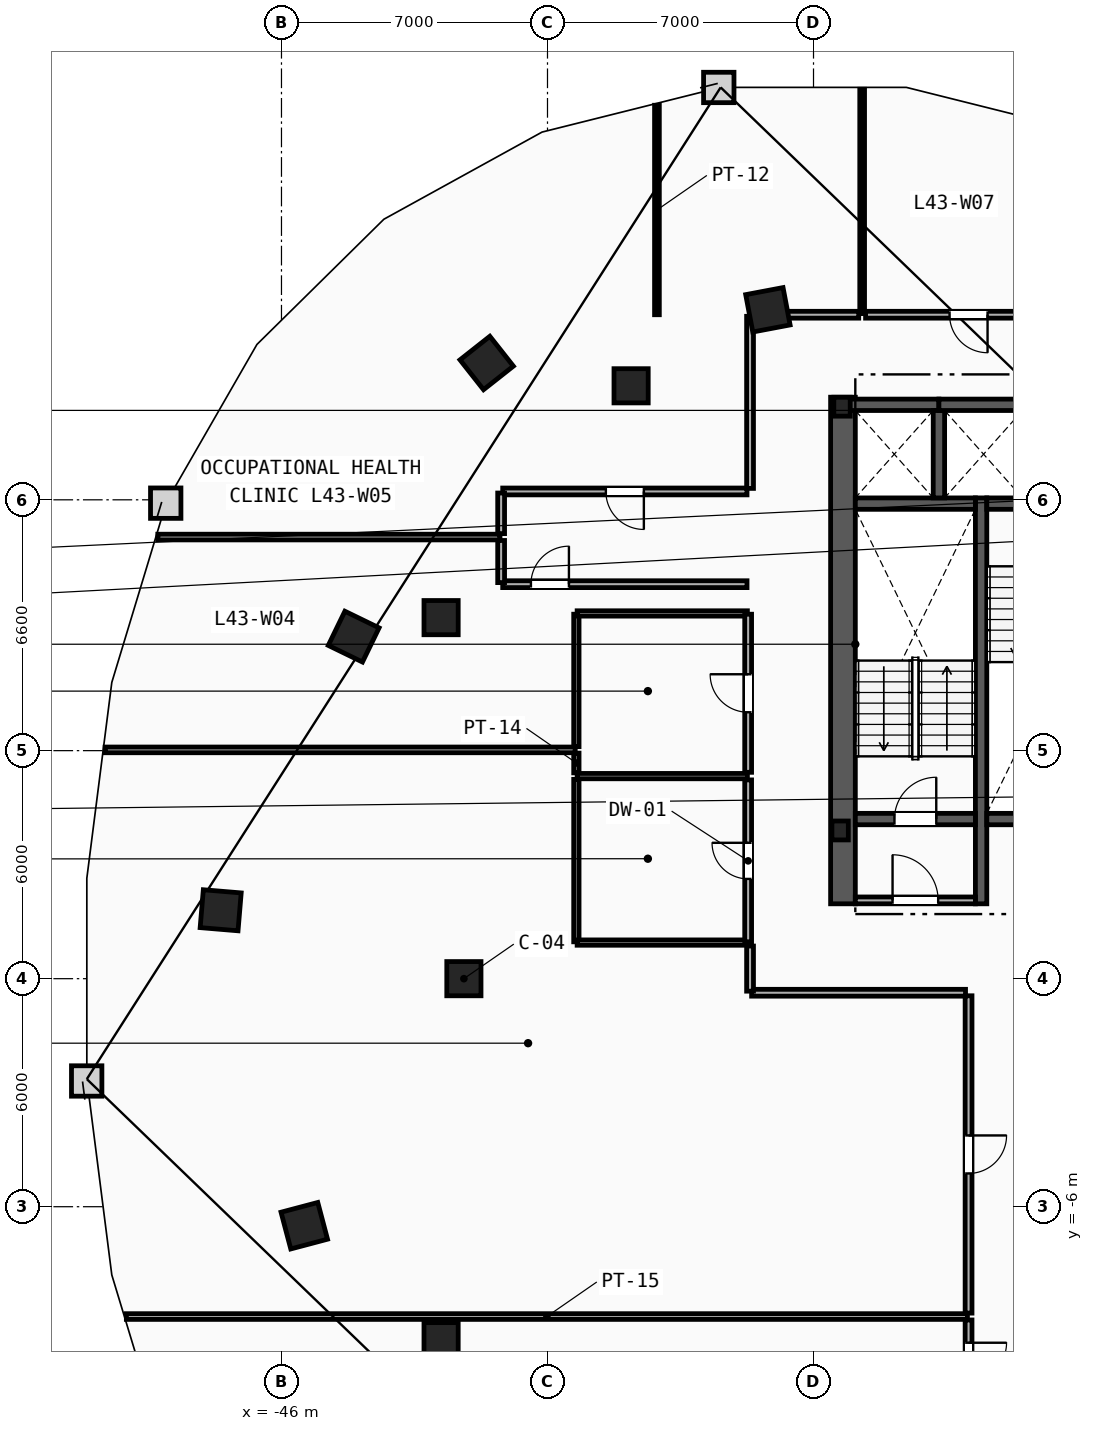
"""IFC4 building model, lengths in metres.
Left out: names, types, materials, properties, quantities, classifications, styles, units other than length and angle.
Written with IfcOpenShell. Run it as: python <this file> out.ifc"""

import sys

from ifc_helpers import new_model, si_unit, direction, frame, frame_2d, origin, origin_2d, place, context, subcontext, project, spatial, rectangle, i_section, extrude, element, fill, save


model = new_model("IFC4")
c1 = context("Model", 3, precision=1e-05, world=origin(), true_north=direction((0.0, 1.0)))
c2 = subcontext(c1, "Body", "Model", "MODEL_VIEW")
j1 = project(units=[si_unit("LENGTHUNIT", "METRE"), si_unit("PLANEANGLEUNIT", "RADIAN")], contexts=[c1])
p1 = place(None, origin())
s1 = spatial("IfcSite", under=j1, at=p1, CompositionType="ELEMENT")
p2 = place(p1, origin())
s2 = spatial("IfcBuilding", under=s1, at=p2, CompositionType="ELEMENT")
p3 = place(p2, frame((0.0, 0.0, 165.6)))
s3 = spatial("IfcBuildingStorey", under=s2, at=p3, CompositionType="ELEMENT", Elevation=165.6)
for number, where, z_axis, x_axis in (
    (1, (-31.3, 3.9, 0.0), (0.0, 0.0, 1.0), (1.0, 0.0, 0.0)),
    (2, (-31.25, 15.05, 0.0), (0.0, 0.0, 1.0), (1.0, 0.0, 0.0)),
):
    element("IfcColumn", number, at=place(p3, frame(where, z_axis=z_axis, x_axis=x_axis)), inside=s3, PredefinedType="COLUMN", context=c2, shape_type="SweptSolid", body=[
        extrude(i_section(OverallWidth=0.432, OverallDepth=0.498, WebThickness=0.056, FlangeThickness=0.089, FilletRadius=0.018, at=origin_2d()), origin(), (0.0, 0.0, 1.0), 3.6),
    ])
for number, where, z_axis, x_axis in (
    (3, (-41.2, 0.0, 0.0), (0.0, 0.0, 1.0), (1.0, 0.0, 0.0)),
    (4, (-41.8, 9.5, 0.0), (0.0, 0.0, 1.0), (1.0, 0.0, 0.0)),
    (5, (-36.8, 15.6, 0.0), (0.0, 0.0, 1.0), (1.0, 0.0, 0.0)),
    (6, (-41.8, -9.5, 0.0), (0.0, 0.0, 1.0), (1.0, 0.0, 0.0)),
):
    element("IfcColumn", number, at=place(p3, frame(where, z_axis=z_axis, x_axis=x_axis)), inside=s3, PredefinedType="COLUMN", context=c2, shape_type="SweptSolid", body=[
        extrude(rectangle(XDim=0.9, YDim=0.9, at=origin_2d()), origin(), (0.0, 0.0, 1.0), 3.6),
    ])
for number, where, z_axis, x_axis in (
    (7, (-33.2, 17.6, 0.0), (0.0, 0.0, 1.0), (-0.983, -0.186, 0.0)),
    (8, (-40.6, 16.2, 0.0), (0.0, 0.0, 1.0), (-0.785, -0.619, 0.0)),
    (9, (-44.1, 9.0, 0.0), (0.0, 0.0, 1.0), (-0.437, -0.899, 0.0)),
    (10, (-47.6, 1.8, 0.0), (0.0, 0.0, 1.0), (-0.084, -0.997, 0.0)),
    (11, (-45.4, -6.5, 0.0), (0.0, 0.0, 1.0), (0.256, -0.967, 0.0)),
):
    element("IfcColumn", number, at=place(p3, frame(where, z_axis=z_axis, x_axis=x_axis)), inside=s3, PredefinedType="COLUMN", context=c2, shape_type="SweptSolid", body=[
        extrude(rectangle(XDim=1.0, YDim=1.0, at=origin_2d()), origin(), (0.0, 0.0, 1.0), 3.6),
    ])
p4 = place(p3, frame((-31.225, 1.97, 0.0), z_axis=(0.0, 0.0, 1.0), x_axis=(0.0, 1.0, 0.0)))
e12 = element("IfcWall", 12, at=p4, inside=s3, PredefinedType="SHEAR", context=c2, shape_type="SweptSolid", body=[
    extrude(rectangle(XDim=13.33, YDim=0.65, at=frame_2d((6.665, 0.0))), origin(), (0.0, 0.0, 1.0), 3.36),
])
p5 = place(p3, frame((-27.59, 1.97, 0.0), z_axis=(0.0, 0.0, 1.0), x_axis=(0.0, 1.0, 0.0)))
e13 = element("IfcWall", 13, at=p5, inside=s3, PredefinedType="SHEAR", context=c2, shape_type="SweptSolid", body=[
    extrude(rectangle(XDim=10.68, YDim=0.3, at=frame_2d((5.34, 0.0))), origin(), (0.0, 0.0, 1.0), 3.36),
])
p6 = place(p3, frame((-30.9, 4.2, 0.0), z_axis=(0.0, 0.0, 1.0), x_axis=(1.0, 0.0, 0.0)))
e14 = element("IfcWall", 14, at=p6, inside=s3, PredefinedType="SHEAR", context=c2, shape_type="SweptSolid", body=[
    extrude(rectangle(XDim=3.16, YDim=0.3, at=frame_2d((1.58, 0.0))), origin(), (0.0, 0.0, 1.0), 3.36),
])
p7 = place(p6, frame((1.03, 0.0, 0.0)))
e15 = element("IfcOpeningElement", 15, at=p7, cuts=e14, PredefinedType="OPENING", context=c2, shape_type="SweptSolid", body=[
    extrude(rectangle(XDim=1.1, YDim=2.15, at=frame_2d((0.55, 1.075))), frame((0.0, 0.16, 0.0), z_axis=(0.0, -1.0, 0.0), x_axis=(1.0, 0.0, 0.0)), (0.0, 0.0, 1.0), 0.32),
])
p8 = place(p3, frame((-30.9, 12.5, 0.0), z_axis=(0.0, 0.0, 1.0), x_axis=(1.0, 0.0, 0.0)))
e16 = element("IfcWall", 16, at=p8, inside=s3, PredefinedType="SHEAR", context=c2, shape_type="SweptSolid", body=[
    extrude(rectangle(XDim=3.16, YDim=0.3, at=frame_2d((1.58, 0.0))), origin(), (0.0, 0.0, 1.0), 3.36),
])
p9 = place(p3, frame((-27.44, 12.5, 0.0), z_axis=(0.0, 0.0, 1.0), x_axis=(1.0, 0.0, 0.0)))
e17 = element("IfcWall", 17, at=p9, inside=s3, PredefinedType="SHEAR", context=c2, shape_type="SweptSolid", body=[
    extrude(rectangle(XDim=3.16, YDim=0.3, at=frame_2d((1.58, 0.0))), origin(), (0.0, 0.0, 1.0), 3.36),
])
p10 = place(p9, frame((1.03, 0.0, 0.0)))
e18 = element("IfcOpeningElement", 18, at=p10, cuts=e17, PredefinedType="OPENING", context=c2, shape_type="SweptSolid", body=[
    extrude(rectangle(XDim=1.1, YDim=2.15, at=frame_2d((0.55, 1.075))), frame((0.0, 0.16, 0.0), z_axis=(0.0, -1.0, 0.0), x_axis=(1.0, 0.0, 0.0)), (0.0, 0.0, 1.0), 0.32),
])
p11 = place(p3, frame((-27.44, 4.2, 0.0), z_axis=(0.0, 0.0, 1.0), x_axis=(1.0, 0.0, 0.0)))
e19 = element("IfcWall", 19, at=p11, inside=s3, PredefinedType="SHEAR", context=c2, shape_type="SweptSolid", body=[
    extrude(rectangle(XDim=3.16, YDim=0.3, at=frame_2d((1.58, 0.0))), origin(), (0.0, 0.0, 1.0), 3.36),
])
p12 = place(p3, frame((-30.9, 2.06, 0.0), z_axis=(0.0, 0.0, 1.0), x_axis=(1.0, 0.0, 0.0)))
e20 = element("IfcWall", 20, at=p12, inside=s3, PredefinedType="PARTITIONING", context=c2, shape_type="SweptSolid", body=[
    extrude(rectangle(XDim=3.16, YDim=0.18, at=frame_2d((1.58, 0.0))), origin(), (0.0, 0.0, 1.0), 3.36),
])
p13 = place(p12, frame((0.98, 0.0, 0.0)))
e21 = element("IfcOpeningElement", 21, at=p13, cuts=e20, PredefinedType="OPENING", context=c2, shape_type="SweptSolid", body=[
    extrude(rectangle(XDim=1.2, YDim=2.15, at=frame_2d((0.6, 1.075))), frame((0.0, 0.1, 0.0), z_axis=(0.0, -1.0, 0.0), x_axis=(1.0, 0.0, 0.0)), (0.0, 0.0, 1.0), 0.2),
])
p14 = place(p3, frame((-31.2, 15.1, 0.0), z_axis=(0.0, 0.0, 1.0), x_axis=(1.0, 0.0, 0.0)))
e22 = element("IfcWall", 22, at=p14, inside=s3, PredefinedType="SHEAR", context=c2, shape_type="SweptSolid", body=[
    extrude(rectangle(XDim=2.5, YDim=0.3, at=frame_2d((1.25, 0.0))), origin(), (0.0, 0.0, 1.0), 3.36),
])
p15 = place(p3, frame((-28.7, 12.65, 0.0), z_axis=(0.0, 0.0, 1.0), x_axis=(0.0, 1.0, 0.0)))
e23 = element("IfcWall", 23, at=p15, inside=s3, PredefinedType="SHEAR", context=c2, shape_type="SweptSolid", body=[
    extrude(rectangle(XDim=2.3, YDim=0.3, at=frame_2d((1.15, 0.0))), origin(), (0.0, 0.0, 1.0), 3.36),
])
p16 = place(p3, frame((-28.7, 15.1, 0.0), z_axis=(0.0, 0.0, 1.0), x_axis=(1.0, 0.0, 0.0)))
e24 = element("IfcWall", 24, at=p16, inside=s3, PredefinedType="SHEAR", context=c2, shape_type="SweptSolid", body=[
    extrude(rectangle(XDim=2.5, YDim=0.3, at=frame_2d((1.25, 0.0))), origin(), (0.0, 0.0, 1.0), 3.36),
])
p17 = place(p3, frame((-38.24, 0.97, 0.0), z_axis=(0.0, 0.0, 1.0), x_axis=(0.0, 1.0, 0.0)))
e25 = element("IfcWall", 25, at=p17, inside=s3, PredefinedType="PARTITIONING", context=c2, shape_type="SweptSolid", body=[
    extrude(rectangle(XDim=4.275, YDim=0.14, at=frame_2d((2.138, 0.0))), origin(), (0.0, 0.0, 1.0), 3.36),
])
p18 = place(p3, frame((-38.24, 5.415, 0.0), z_axis=(0.0, 0.0, 1.0), x_axis=(0.0, 1.0, 0.0)))
e26 = element("IfcWall", 26, at=p18, inside=s3, PredefinedType="PARTITIONING", context=c2, shape_type="SweptSolid", body=[
    extrude(rectangle(XDim=0.52, YDim=0.14, at=frame_2d((0.26, 0.0))), origin(), (0.0, 0.0, 1.0), 3.36),
])
p19 = place(p3, frame((-38.24, 6.105, 0.0), z_axis=(0.0, 0.0, 1.0), x_axis=(0.0, 1.0, 0.0)))
e27 = element("IfcWall", 27, at=p19, inside=s3, PredefinedType="PARTITIONING", context=c2, shape_type="SweptSolid", body=[
    extrude(rectangle(XDim=3.485, YDim=0.14, at=frame_2d((1.743, 0.0))), origin(), (0.0, 0.0, 1.0), 3.36),
])
for number, where, z_axis, x_axis in (
    (28, (-38.22, 0.95, 0.0), (0.0, 0.0, 1.0), (1.0, 0.0, 0.0)),
    (29, (-38.22, 5.33, 0.0), (0.0, 0.0, 1.0), (1.0, 0.0, 0.0)),
    (30, (-38.22, 9.61, 0.0), (0.0, 0.0, 1.0), (1.0, 0.0, 0.0)),
):
    element("IfcWall", number, at=place(p3, frame(where, z_axis=z_axis, x_axis=x_axis)), inside=s3, PredefinedType="PARTITIONING", context=c2, shape_type="SweptSolid", body=[
        extrude(rectangle(XDim=4.48, YDim=0.14, at=frame_2d((2.24, 0.0))), origin(), (0.0, 0.0, 1.0), 3.36),
    ])
p20 = place(p3, frame((-33.72, 0.97, 0.0), z_axis=(0.0, 0.0, 1.0), x_axis=(0.0, 1.0, 0.0)))
e31 = element("IfcWall", 31, at=p20, inside=s3, PredefinedType="PARTITIONING", context=c2, shape_type="SweptSolid", body=[
    extrude(rectangle(XDim=4.26, YDim=0.18, at=frame_2d((2.13, 0.0))), origin(), (0.0, 0.0, 1.0), 3.36),
])
p21 = place(p20, frame((1.655, 0.0, 0.0)))
e32 = element("IfcOpeningElement", 32, at=p21, cuts=e31, PredefinedType="OPENING", context=c2, shape_type="SweptSolid", body=[
    extrude(rectangle(XDim=0.95, YDim=2.1, at=frame_2d((0.475, 1.05))), frame((0.0, 0.1, 0.0), z_axis=(0.0, -1.0, 0.0), x_axis=(1.0, 0.0, 0.0)), (0.0, 0.0, 1.0), 0.2),
])
p22 = place(p3, frame((-33.72, 5.43, 0.0), z_axis=(0.0, 0.0, 1.0), x_axis=(0.0, 1.0, 0.0)))
e33 = element("IfcWall", 33, at=p22, inside=s3, PredefinedType="PARTITIONING", context=c2, shape_type="SweptSolid", body=[
    extrude(rectangle(XDim=4.16, YDim=0.18, at=frame_2d((2.08, 0.0))), origin(), (0.0, 0.0, 1.0), 3.36),
])
p23 = place(p22, frame((1.58, 0.0, 0.0)))
e34 = element("IfcOpeningElement", 34, at=p23, cuts=e33, PredefinedType="OPENING", context=c2, shape_type="SweptSolid", body=[
    extrude(rectangle(XDim=1.0, YDim=2.15, at=frame_2d((0.5, 1.075))), frame((0.0, 0.1, 0.0), z_axis=(0.0, -1.0, 0.0), x_axis=(1.0, 0.0, 0.0)), (0.0, 0.0, 1.0), 0.2),
])
p24 = place(p3, frame((-50.082, -8.89, 0.0), z_axis=(0.0, 0.0, 1.0), x_axis=(1.0, 0.0, 0.0)))
e35 = element("IfcWall", 35, at=p24, inside=s3, PredefinedType="PARTITIONING", context=c2, shape_type="SweptSolid", body=[
    extrude(rectangle(XDim=22.132, YDim=0.15, at=frame_2d((11.066, 0.0))), origin(), (0.0, 0.0, 1.0), 3.36),
])
p25 = place(p3, frame((-50.641, 6.02, 0.0), z_axis=(0.0, 0.0, 1.0), x_axis=(1.0, 0.0, 0.0)))
e36 = element("IfcWall", 36, at=p25, inside=s3, PredefinedType="PARTITIONING", context=c2, shape_type="SweptSolid", body=[
    extrude(rectangle(XDim=12.371, YDim=0.15, at=frame_2d((6.186, 0.0))), origin(), (0.0, 0.0, 1.0), 3.36),
])
p26 = place(p3, frame((-49.254, 11.62, 0.0), z_axis=(0.0, 0.0, 1.0), x_axis=(1.0, 0.0, 0.0)))
e37 = element("IfcWall", 37, at=p26, inside=s3, PredefinedType="PARTITIONING", context=c2, shape_type="SweptSolid", body=[
    extrude(rectangle(XDim=9.004, YDim=0.15, at=frame_2d((4.502, 0.0))), origin(), (0.0, 0.0, 1.0), 3.36),
])
p27 = place(p3, frame((-36.12, 17.47, 0.0), z_axis=(0.0, 0.0, 1.0), x_axis=(0.0, 1.0, 0.0)))
e38 = element("IfcWall", 38, at=p27, inside=s3, PredefinedType="PARTITIONING", context=c2, shape_type="SweptSolid", body=[
    extrude(rectangle(XDim=5.511, YDim=0.125, at=frame_2d((2.756, 0.0))), origin(), (0.0, 0.0, 1.0), 3.36),
])
p28 = place(p3, frame((-30.72, 17.5, 0.0), z_axis=(0.0, 0.0, 1.0), x_axis=(0.0, 1.0, 0.0)))
e39 = element("IfcWall", 39, at=p28, inside=s3, PredefinedType="PARTITIONING", context=c2, shape_type="SweptSolid", body=[
    extrude(rectangle(XDim=5.902, YDim=0.125, at=frame_2d((2.951, 0.0))), origin(), (0.0, 0.0, 1.0), 3.36),
])
p29 = place(p3, frame((-27.92, -8.98, 0.0), z_axis=(0.0, 0.0, 1.0), x_axis=(0.0, -1.0, 0.0)))
e40 = element("IfcWall", 40, at=p29, inside=s3, PredefinedType="PARTITIONING", context=c2, shape_type="SweptSolid", body=[
    extrude(rectangle(XDim=2.198, YDim=0.18, at=frame_2d((1.099, 0.0))), origin(), (0.0, 0.0, 1.0), 3.36),
])
p30 = place(p29, frame((0.599, 0.0, 0.0)))
e41 = element("IfcOpeningElement", 41, at=p30, cuts=e40, PredefinedType="OPENING", context=c2, shape_type="SweptSolid", body=[
    extrude(rectangle(XDim=1.0, YDim=2.15, at=frame_2d((0.5, 1.075))), frame((0.0, 0.1, 0.0), z_axis=(0.0, -1.0, 0.0), x_axis=(1.0, 0.0, 0.0)), (0.0, 0.0, 1.0), 0.2),
])
p31 = place(p3, frame((-27.92, -0.45, 0.0), z_axis=(0.0, 0.0, 1.0), x_axis=(0.0, -1.0, 0.0)))
e42 = element("IfcWall", 42, at=p31, inside=s3, PredefinedType="PARTITIONING", context=c2, shape_type="SweptSolid", body=[
    extrude(rectangle(XDim=8.35, YDim=0.18, at=frame_2d((4.175, 0.0))), origin(), (0.0, 0.0, 1.0), 3.36),
])
p32 = place(p31, frame((3.675, 0.0, 0.0)))
e43 = element("IfcOpeningElement", 43, at=p32, cuts=e42, PredefinedType="OPENING", context=c2, shape_type="SweptSolid", body=[
    extrude(rectangle(XDim=1.0, YDim=2.15, at=frame_2d((0.5, 1.075))), frame((0.0, 0.1, 0.0), z_axis=(0.0, -1.0, 0.0), x_axis=(1.0, 0.0, 0.0)), (0.0, 0.0, 1.0), 0.2),
])
p33 = place(p3, frame((-33.628, -0.37, 0.0), z_axis=(0.0, 0.0, 1.0), x_axis=(1.0, 0.0, 0.0)))
e44 = element("IfcWall", 44, at=p33, inside=s3, PredefinedType="PARTITIONING", context=c2, shape_type="SweptSolid", body=[
    extrude(rectangle(XDim=5.628, YDim=0.18, at=frame_2d((2.814, 0.0))), origin(), (0.0, 0.0, 1.0), 3.36),
])
p34 = place(p3, frame((-33.67, 0.859, 0.0), z_axis=(0.0, 0.0, 1.0), x_axis=(0.0, -1.0, 0.0)))
e45 = element("IfcWall", 45, at=p34, inside=s3, PredefinedType="PARTITIONING", context=c2, shape_type="SweptSolid", body=[
    extrude(rectangle(XDim=1.187, YDim=0.18, at=frame_2d((0.594, 0.0))), origin(), (0.0, 0.0, 1.0), 3.36),
])
p35 = place(p3, frame((-40.178, 10.38, 0.0), z_axis=(0.0, 0.0, 1.0), x_axis=(1.0, 0.0, 0.0)))
e46 = element("IfcWall", 46, at=p35, inside=s3, PredefinedType="PARTITIONING", context=c2, shape_type="SweptSolid", body=[
    extrude(rectangle(XDim=6.428, YDim=0.18, at=frame_2d((3.214, 0.0))), origin(), (0.0, 0.0, 1.0), 3.36),
])
p36 = place(p35, frame((0.743, 0.0, 0.0)))
e47 = element("IfcOpeningElement", 47, at=p36, cuts=e46, PredefinedType="OPENING", context=c2, shape_type="SweptSolid", body=[
    extrude(rectangle(XDim=1.0, YDim=2.15, at=frame_2d((0.5, 1.075))), frame((0.0, 0.1, 0.0), z_axis=(0.0, -1.0, 0.0), x_axis=(1.0, 0.0, 0.0)), (0.0, 0.0, 1.0), 0.2),
])
p37 = place(p3, frame((-40.22, 11.53, 0.0), z_axis=(0.0, 0.0, 1.0), x_axis=(0.0, -1.0, 0.0)))
e48 = element("IfcWall", 48, at=p37, inside=s3, PredefinedType="PARTITIONING", context=c2, shape_type="SweptSolid", body=[
    extrude(rectangle(XDim=1.109, YDim=0.18, at=frame_2d((0.554, 0.0))), origin(), (0.0, 0.0, 1.0), 3.36),
])
p38 = place(p3, frame((-33.75, 12.82, 0.0), z_axis=(0.0, 0.0, 1.0), x_axis=(-1.0, 0.0, 0.0)))
e49 = element("IfcWall", 49, at=p38, inside=s3, PredefinedType="PARTITIONING", context=c2, shape_type="SweptSolid", body=[
    extrude(rectangle(XDim=6.428, YDim=0.18, at=frame_2d((3.214, 0.0))), origin(), (0.0, 0.0, 1.0), 3.36),
])
p39 = place(p38, frame((2.714, 0.0, 0.0)))
e50 = element("IfcOpeningElement", 50, at=p39, cuts=e49, PredefinedType="OPENING", context=c2, shape_type="SweptSolid", body=[
    extrude(rectangle(XDim=1.0, YDim=2.15, at=frame_2d((0.5, 1.075))), frame((0.0, 0.1, 0.0), z_axis=(0.0, -1.0, 0.0), x_axis=(1.0, 0.0, 0.0)), (0.0, 0.0, 1.0), 0.2),
])
p40 = place(p3, frame((-33.67, 17.428, 0.0), z_axis=(0.0, 0.0, 1.0), x_axis=(0.0, -1.0, 0.0)))
e51 = element("IfcWall", 51, at=p40, inside=s3, PredefinedType="PARTITIONING", context=c2, shape_type="SweptSolid", body=[
    extrude(rectangle(XDim=4.529, YDim=0.18, at=frame_2d((2.264, 0.0))), origin(), (0.0, 0.0, 1.0), 3.36),
])
p41 = place(p3, frame((-30.81, 17.47, 0.0), z_axis=(0.0, 0.0, 1.0), x_axis=(-1.0, 0.0, 0.0)))
e52 = element("IfcWall", 52, at=p41, inside=s3, PredefinedType="PARTITIONING", context=c2, shape_type="SweptSolid", body=[
    extrude(rectangle(XDim=2.818, YDim=0.18, at=frame_2d((1.409, 0.0))), origin(), (0.0, 0.0, 1.0), 3.36),
])
p42 = place(p3, frame((-40.22, 12.779, 0.0), z_axis=(0.0, 0.0, 1.0), x_axis=(0.0, -1.0, 0.0)))
e53 = element("IfcWall", 53, at=p42, inside=s3, PredefinedType="PARTITIONING", context=c2, shape_type="SweptSolid", body=[
    extrude(rectangle(XDim=1.069, YDim=0.18, at=frame_2d((0.534, 0.0))), origin(), (0.0, 0.0, 1.0), 3.36),
])
p43 = place(p3, frame((-25.21, 17.47, 0.0), z_axis=(0.0, 0.0, 1.0), x_axis=(-1.0, 0.0, 0.0)))
e54 = element("IfcWall", 54, at=p43, inside=s3, PredefinedType="PARTITIONING", context=c2, shape_type="SweptSolid", body=[
    extrude(rectangle(XDim=5.42, YDim=0.18, at=frame_2d((2.71, 0.0))), origin(), (0.0, 0.0, 1.0), 3.36),
])
p44 = place(p43, frame((2.21, 0.0, 0.0)))
e55 = element("IfcOpeningElement", 55, at=p44, cuts=e54, PredefinedType="OPENING", context=c2, shape_type="SweptSolid", body=[
    extrude(rectangle(XDim=1.0, YDim=2.15, at=frame_2d((0.5, 1.075))), frame((0.0, 0.1, 0.0), z_axis=(0.0, -1.0, 0.0), x_axis=(1.0, 0.0, 0.0)), (0.0, 0.0, 1.0), 0.2),
])
p45 = place(p7, origin())
e56 = element("IfcDoor", 56, at=p45, inside=s3, OperationType="SINGLE_SWING_RIGHT", PredefinedType="DOOR", context=c2, shape_type="SweptSolid", body=[
    extrude(rectangle(XDim=1.1, YDim=2.15, at=frame_2d((0.55, 1.075))), frame((0.0, 0.025, 0.0), z_axis=(0.0, -1.0, 0.0), x_axis=(1.0, 0.0, 0.0)), (0.0, 0.0, 1.0), 0.05),
])
fill(e15, e56)
p46 = place(p13, origin())
e57 = element("IfcDoor", 57, at=p46, inside=s3, OperationType="SINGLE_SWING_LEFT", PredefinedType="DOOR", context=c2, shape_type="SweptSolid", body=[
    extrude(rectangle(XDim=1.2, YDim=2.15, at=frame_2d((0.6, 1.075))), frame((0.0, 0.025, 0.0), z_axis=(0.0, -1.0, 0.0), x_axis=(1.0, 0.0, 0.0)), (0.0, 0.0, 1.0), 0.05),
])
fill(e21, e57)
p47 = place(p32, origin())
e58 = element("IfcDoor", 58, at=p47, inside=s3, OperationType="SINGLE_SWING_LEFT", PredefinedType="DOOR", context=c2, shape_type="SweptSolid", body=[
    extrude(rectangle(XDim=1.0, YDim=2.15, at=frame_2d((0.5, 1.075))), frame((0.0, 0.025, 0.0), z_axis=(0.0, -1.0, 0.0), x_axis=(1.0, 0.0, 0.0)), (0.0, 0.0, 1.0), 0.05),
])
fill(e43, e58)
p48 = place(p36, origin())
e59 = element("IfcDoor", 59, at=p48, inside=s3, OperationType="SINGLE_SWING_RIGHT", PredefinedType="DOOR", context=c2, shape_type="SweptSolid", body=[
    extrude(rectangle(XDim=1.0, YDim=2.15, at=frame_2d((0.5, 1.075))), frame((0.0, 0.025, 0.0), z_axis=(0.0, -1.0, 0.0), x_axis=(1.0, 0.0, 0.0)), (0.0, 0.0, 1.0), 0.05),
])
fill(e47, e59)
p49 = place(p39, origin())
e60 = element("IfcDoor", 60, at=p49, inside=s3, OperationType="SINGLE_SWING_LEFT", PredefinedType="DOOR", context=c2, shape_type="SweptSolid", body=[
    extrude(rectangle(XDim=1.0, YDim=2.15, at=frame_2d((0.5, 1.075))), frame((0.0, 0.025, 0.0), z_axis=(0.0, -1.0, 0.0), x_axis=(1.0, 0.0, 0.0)), (0.0, 0.0, 1.0), 0.05),
])
fill(e50, e60)
p50 = place(p44, origin())
e61 = element("IfcDoor", 61, at=p50, inside=s3, OperationType="SINGLE_SWING_LEFT", PredefinedType="DOOR", context=c2, shape_type="SweptSolid", body=[
    extrude(rectangle(XDim=1.0, YDim=2.15, at=frame_2d((0.5, 1.075))), frame((0.0, 0.025, 0.0), z_axis=(0.0, -1.0, 0.0), x_axis=(1.0, 0.0, 0.0)), (0.0, 0.0, 1.0), 0.05),
])
fill(e55, e61)
p51 = place(p21, origin())
e62 = element("IfcDoor", 62, at=p51, inside=s3, OperationType="SINGLE_SWING_RIGHT", PredefinedType="DOOR", context=c2, shape_type="SweptSolid", body=[
    extrude(rectangle(XDim=0.95, YDim=2.1, at=frame_2d((0.475, 1.05))), frame((0.0, 0.025, 0.0), z_axis=(0.0, -1.0, 0.0), x_axis=(1.0, 0.0, 0.0)), (0.0, 0.0, 1.0), 0.05),
])
fill(e32, e62)
p52 = place(p23, origin())
e63 = element("IfcDoor", 63, at=p52, inside=s3, OperationType="SINGLE_SWING_RIGHT", PredefinedType="DOOR", context=c2, shape_type="SweptSolid", body=[
    extrude(rectangle(XDim=1.0, YDim=2.15, at=frame_2d((0.5, 1.075))), frame((0.0, 0.025, 0.0), z_axis=(0.0, -1.0, 0.0), x_axis=(1.0, 0.0, 0.0)), (0.0, 0.0, 1.0), 0.05),
])
fill(e34, e63)
p53 = place(p30, origin())
e64 = element("IfcDoor", 64, at=p53, inside=s3, OperationType="SINGLE_SWING_LEFT", PredefinedType="DOOR", context=c2, shape_type="SweptSolid", body=[
    extrude(rectangle(XDim=1.0, YDim=2.15, at=frame_2d((0.5, 1.075))), frame((0.0, 0.025, 0.0), z_axis=(0.0, -1.0, 0.0), x_axis=(1.0, 0.0, 0.0)), (0.0, 0.0, 1.0), 0.05),
])
fill(e41, e64)
save(model, sys.argv[1])
